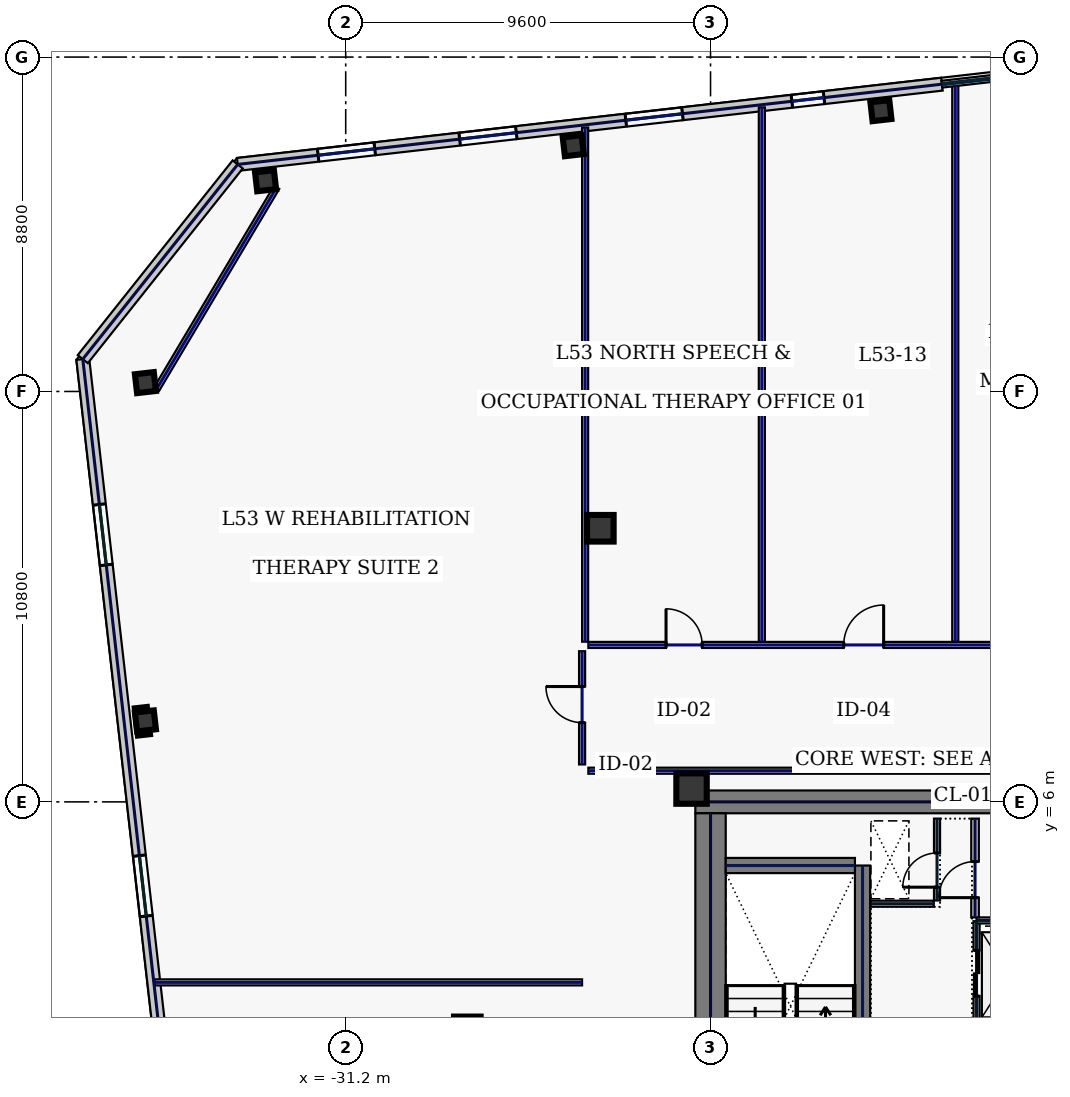
"""IFC4 building model, lengths in metres.
Left out: names, types, materials, properties, quantities, classifications, styles, units other than length and angle.
Written with IfcOpenShell. Run it as: python <this file> out.ifc"""

import sys

from ifc_helpers import new_model, si_unit, direction, frame, frame_2d, origin, origin_2d, place, context, subcontext, project, spatial, rectangle, hollow_rectangle, extrude, element, fill, save


model = new_model("IFC4")
c1 = context("Model", 3, precision=1e-05, world=origin(), true_north=direction((0.0, 1.0)))
c2 = subcontext(c1, "Body", "Model", "MODEL_VIEW")
j1 = project(units=[si_unit("LENGTHUNIT", "METRE"), si_unit("PLANEANGLEUNIT", "RADIAN")], contexts=[c1])
p1 = place(None, origin())
s1 = spatial("IfcSite", under=j1, at=p1, CompositionType="ELEMENT")
p2 = place(p1, origin())
s2 = spatial("IfcBuilding", under=s1, at=p2, CompositionType="ELEMENT")
p3 = place(p2, frame((0.0, 0.0, 230.2)))
s3 = spatial("IfcBuildingStorey", under=s2, at=p3, CompositionType="ELEMENT", Elevation=230.2)
p4 = place(p3, frame((-22.0, 6.0, 0.0), z_axis=(0.0, 0.0, 1.0), x_axis=(1.0, 0.0, 0.0)))
e1 = element("IfcWall", 1, at=p4, inside=s3, PredefinedType="SHEAR", context=c2, shape_type="SweptSolid", body=[
    extrude(rectangle(XDim=11.5, YDim=0.6, at=frame_2d((5.75, 0.0))), origin(), (0.0, 0.0, 1.0), 3.74),
])
p5 = place(p3, frame((-21.6, -5.7, 0.0), z_axis=(0.0, 0.0, 1.0), x_axis=(0.0, 1.0, 0.0)))
e2 = element("IfcWall", 2, at=p5, inside=s3, PredefinedType="SHEAR", context=c2, shape_type="SweptSolid", body=[
    extrude(rectangle(XDim=11.4, YDim=0.8, at=frame_2d((5.7, 0.0))), origin(), (0.0, 0.0, 1.0), 3.74),
])
p6 = place(p3, frame((-17.6, -4.325, 0.0), z_axis=(0.0, 0.0, 1.0), x_axis=(0.0, 1.0, 0.0)))
e3 = element("IfcWall", 3, at=p6, inside=s3, PredefinedType="SHEAR", context=c2, shape_type="SweptSolid", body=[
    extrude(rectangle(XDim=8.65, YDim=0.4, at=frame_2d((4.325, 0.0))), origin(), (0.0, 0.0, 1.0), 3.74),
])
p7 = place(p6, frame((0.25, 0.0, 0.0)))
e4 = element("IfcOpeningElement", 4, at=p7, cuts=e3, PredefinedType="OPENING", context=c2, shape_type="SweptSolid", body=[
    extrude(rectangle(XDim=1.1, YDim=2.2, at=frame_2d((0.55, 1.1))), frame((0.0, 0.21, 0.0), z_axis=(0.0, -1.0, 0.0), x_axis=(1.0, 0.0, 0.0)), (0.0, 0.0, 1.0), 0.42),
])
p8 = place(p3, frame((-21.2, 4.325, 0.0), z_axis=(0.0, 0.0, 1.0), x_axis=(1.0, 0.0, 0.0)))
e5 = element("IfcWall", 5, at=p8, inside=s3, PredefinedType="SHEAR", context=c2, shape_type="SweptSolid", body=[
    extrude(rectangle(XDim=3.4, YDim=0.4, at=frame_2d((1.7, 0.0))), origin(), (0.0, 0.0, 1.0), 3.74),
])
p9 = place(p3, frame((-22.1, 6.35, 0.0), z_axis=(0.0, 0.0, 1.0), x_axis=(1.0, 0.0, 0.0)))
e6 = element("IfcColumn", 6, at=p9, inside=s3, PredefinedType="COLUMN", context=c2, shape_type="SweptSolid", body=[
    extrude(hollow_rectangle(XDim=0.8, YDim=0.8, WallThickness=0.036, at=origin_2d()), origin(), (0.0, 0.0, 1.0), 3.74),
])
for number, where, z_axis, x_axis in (
    (7, (-24.5, 13.2, 0.0), (0.0, 0.0, 1.0), (1.0, 0.0, 0.0)),
    (8, (-28.0, 0.0, 0.0), (0.0, 0.0, 1.0), (1.0, 0.0, 0.0)),
):
    element("IfcColumn", number, at=place(p3, frame(where, z_axis=z_axis, x_axis=x_axis)), inside=s3, PredefinedType="COLUMN", context=c2, shape_type="SweptSolid", body=[
        extrude(hollow_rectangle(XDim=0.7, YDim=0.7, WallThickness=0.032, at=origin_2d()), origin(), (0.0, 0.0, 1.0), 3.74),
    ])
for number, where, z_axis, x_axis in (
    (9, (-17.116, 24.19, 0.0), (0.0, 0.0, 1.0), (0.994, 0.113, 0.0)),
    (10, (-25.212, 23.268, 0.0), (0.0, 0.0, 1.0), (0.994, 0.113, 0.0)),
    (11, (-33.309, 22.345, 0.0), (0.0, 0.0, 1.0), (0.994, 0.113, 0.0)),
    (12, (-36.47, 17.033, 0.0), (0.0, 0.0, 1.0), (0.994, 0.113, 0.0)),
    (13, (-36.47, 8.131, 0.0), (0.0, 0.0, 1.0), (0.994, 0.113, 0.0)),
):
    element("IfcColumn", number, at=place(p3, frame(where, z_axis=z_axis, x_axis=x_axis)), inside=s3, PredefinedType="COLUMN", context=c2, shape_type="SweptSolid", body=[
        extrude(hollow_rectangle(XDim=0.5, YDim=0.5, WallThickness=0.025, at=origin_2d()), origin(), (0.0, 0.0, 1.0), 3.74),
    ])
p10 = place(p3, frame((-15.51, 24.886, 0.0), z_axis=(0.0, 0.0, 1.0), x_axis=(-0.993572271362, -0.113199565282, 0.0)))
e14 = element("IfcWall", 14, at=p10, inside=s3, PredefinedType="STANDARD", context=c2, shape_type="SweptSolid", body=[
    extrude(rectangle(XDim=18.651, YDim=0.34, at=frame_2d((9.326, 0.0))), origin(), (0.0, 0.0, 1.0), 3.74),
])
p11 = place(p10, frame((15.021, 0.0, 0.83)))
e15 = element("IfcOpeningElement", 15, at=p11, cuts=e14, PredefinedType="OPENING", context=c2, shape_type="SweptSolid", body=[
    extrude(rectangle(XDim=1.5, YDim=2.0, at=frame_2d((0.75, 1.0))), frame((0.0, 0.18, 0.0), z_axis=(0.0, -1.0, 0.0), x_axis=(1.0, 0.0, 0.0)), (0.0, 0.0, 1.0), 0.36),
])
p12 = place(p10, frame((11.273, 0.0, 0.83)))
e16 = element("IfcOpeningElement", 16, at=p12, cuts=e14, PredefinedType="OPENING", context=c2, shape_type="SweptSolid", body=[
    extrude(rectangle(XDim=1.5, YDim=2.0, at=frame_2d((0.75, 1.0))), frame((0.0, 0.18, 0.0), z_axis=(0.0, -1.0, 0.0), x_axis=(1.0, 0.0, 0.0)), (0.0, 0.0, 1.0), 0.36),
])
p13 = place(p10, frame((6.873, 0.0, 0.83)))
e17 = element("IfcOpeningElement", 17, at=p13, cuts=e14, PredefinedType="OPENING", context=c2, shape_type="SweptSolid", body=[
    extrude(rectangle(XDim=1.5, YDim=2.0, at=frame_2d((0.75, 1.0))), frame((0.0, 0.18, 0.0), z_axis=(0.0, -1.0, 0.0), x_axis=(1.0, 0.0, 0.0)), (0.0, 0.0, 1.0), 0.36),
])
p14 = place(p10, frame((3.125, 0.0, 0.83)))
e18 = element("IfcOpeningElement", 18, at=p14, cuts=e14, PredefinedType="OPENING", context=c2, shape_type="SweptSolid", body=[
    extrude(rectangle(XDim=0.85, YDim=1.85, at=frame_2d((0.425, 0.925))), frame((0.0, 0.18, 0.0), z_axis=(0.0, -1.0, 0.0), x_axis=(1.0, 0.0, 0.0)), (0.0, 0.0, 1.0), 0.36),
])
p15 = place(p3, frame((-38.118, 17.651, 0.0), z_axis=(0.0, 0.0, 1.0), x_axis=(0.11320360501, -0.9935718111, 0.0)))
e19 = element("IfcWall", 19, at=p15, inside=s3, PredefinedType="STANDARD", context=c2, shape_type="SweptSolid", body=[
    extrude(rectangle(XDim=37.2, YDim=0.34, at=frame_2d((18.6, 0.0))), origin(), (0.0, 0.0, 1.0), 3.74),
])
p16 = place(p15, frame((3.85, 0.0, 0.58)))
e20 = element("IfcOpeningElement", 20, at=p16, cuts=e19, PredefinedType="OPENING", context=c2, shape_type="SweptSolid", body=[
    extrude(rectangle(XDim=1.6, YDim=2.3, at=frame_2d((0.8, 1.15))), frame((0.0, 0.18, 0.0), z_axis=(0.0, -1.0, 0.0), x_axis=(1.0, 0.0, 0.0)), (0.0, 0.0, 1.0), 0.36),
])
p17 = place(p15, frame((13.15, 0.0, 0.58)))
e21 = element("IfcOpeningElement", 21, at=p17, cuts=e19, PredefinedType="OPENING", context=c2, shape_type="SweptSolid", body=[
    extrude(rectangle(XDim=1.6, YDim=2.3, at=frame_2d((0.8, 1.15))), frame((0.0, 0.18, 0.0), z_axis=(0.0, -1.0, 0.0), x_axis=(1.0, 0.0, 0.0)), (0.0, 0.0, 1.0), 0.36),
])
p18 = place(p15, frame((22.45, 0.0, 0.58)))
e22 = element("IfcOpeningElement", 22, at=p18, cuts=e19, PredefinedType="OPENING", context=c2, shape_type="SweptSolid", body=[
    extrude(rectangle(XDim=1.6, YDim=2.3, at=frame_2d((0.8, 1.15))), frame((0.0, 0.18, 0.0), z_axis=(0.0, -1.0, 0.0), x_axis=(1.0, 0.0, 0.0)), (0.0, 0.0, 1.0), 0.36),
])
p19 = place(p15, frame((31.75, 0.0, 0.58)))
e23 = element("IfcOpeningElement", 23, at=p19, cuts=e19, PredefinedType="OPENING", context=c2, shape_type="SweptSolid", body=[
    extrude(rectangle(XDim=1.6, YDim=2.3, at=frame_2d((0.8, 1.15))), frame((0.0, 0.18, 0.0), z_axis=(0.0, -1.0, 0.0), x_axis=(1.0, 0.0, 0.0)), (0.0, 0.0, 1.0), 0.36),
])
p20 = place(p3, frame((-34.042, 22.775, 0.0), z_axis=(0.0, 0.0, 1.0), x_axis=(-0.62252823689, -0.78259733853, 0.0)))
e24 = element("IfcWall", 24, at=p20, inside=s3, PredefinedType="STANDARD", context=c2, shape_type="SweptSolid", body=[
    extrude(rectangle(XDim=6.548, YDim=0.34, at=frame_2d((3.274, 0.0))), origin(), (0.0, 0.0, 1.0), 3.74),
])
p21 = place(p3, frame((-14.6, 0.12, 0.0), z_axis=(0.0, 0.0, 1.0), x_axis=(0.0, 1.0, 0.0)))
e25 = element("IfcWall", 25, at=p21, inside=s3, PredefinedType="PARTITIONING", context=c2, shape_type="SweptSolid", body=[
    extrude(rectangle(XDim=2.74, YDim=0.16, at=frame_2d((1.37, 0.0))), origin(), (0.0, 0.0, 1.0), 3.74),
])
p22 = place(p21, frame((0.77, 0.0, 0.0)))
e26 = element("IfcOpeningElement", 26, at=p22, cuts=e25, PredefinedType="OPENING", context=c2, shape_type="SweptSolid", body=[
    extrude(rectangle(XDim=1.2, YDim=2.2, at=frame_2d((0.6, 1.1))), frame((0.0, 0.09, 0.0), z_axis=(0.0, -1.0, 0.0), x_axis=(1.0, 0.0, 0.0)), (0.0, 0.0, 1.0), 0.18),
])
p23 = place(p3, frame((-14.6, 2.88, 0.0), z_axis=(0.0, 0.0, 1.0), x_axis=(1.0, 0.0, 0.0)))
e27 = element("IfcWall", 27, at=p23, inside=s3, PredefinedType="PARTITIONING", context=c2, shape_type="SweptSolid", body=[
    extrude(rectangle(XDim=1.76, YDim=0.16, at=frame_2d((0.88, 0.0))), origin(), (0.0, 0.0, 1.0), 3.74),
])
p24 = place(p3, frame((-15.64, 3.405, 0.0), z_axis=(0.0, 0.0, 1.0), x_axis=(0.0, 1.0, 0.0)))
e28 = element("IfcWall", 28, at=p24, inside=s3, PredefinedType="PARTITIONING", context=c2, shape_type="SweptSolid", body=[
    extrude(rectangle(XDim=2.155, YDim=0.16, at=frame_2d((1.078, 0.0))), origin(), (0.0, 0.0, 1.0), 3.74),
])
p25 = place(p24, frame((0.35, 0.0, 0.0)))
e29 = element("IfcOpeningElement", 29, at=p25, cuts=e28, PredefinedType="OPENING", context=c2, shape_type="SweptSolid", body=[
    extrude(rectangle(XDim=0.9, YDim=2.2, at=frame_2d((0.45, 1.1))), frame((0.0, 0.09, 0.0), z_axis=(0.0, -1.0, 0.0), x_axis=(1.0, 0.0, 0.0)), (0.0, 0.0, 1.0), 0.18),
])
p26 = place(p3, frame((-17.38, 3.32, 0.0), z_axis=(0.0, 0.0, 1.0), x_axis=(1.0, 0.0, 0.0)))
e30 = element("IfcWall", 30, at=p26, inside=s3, PredefinedType="PARTITIONING", context=c2, shape_type="SweptSolid", body=[
    extrude(rectangle(XDim=1.655, YDim=0.16, at=frame_2d((0.827, 0.0))), origin(), (0.0, 0.0, 1.0), 3.74),
])
p27 = place(p3, frame((-14.64, 2.96, 0.0), z_axis=(0.0, 0.0, 1.0), x_axis=(0.0, 1.0, 0.0)))
e31 = element("IfcWall", 31, at=p27, inside=s3, PredefinedType="SOLIDWALL", context=c2, shape_type="SweptSolid", body=[
    extrude(rectangle(XDim=2.6, YDim=0.2, at=frame_2d((1.3, 0.0))), origin(), (0.0, 0.0, 1.0), 3.74),
])
p28 = place(p27, frame((0.52, 0.0, 0.0)))
e32 = element("IfcOpeningElement", 32, at=p28, cuts=e31, PredefinedType="OPENING", context=c2, shape_type="SweptSolid", body=[
    extrude(rectangle(XDim=0.95, YDim=2.2, at=frame_2d((0.475, 1.1))), frame((0.0, 0.11, 0.0), z_axis=(0.0, -1.0, 0.0), x_axis=(1.0, 0.0, 0.0)), (0.0, 0.0, 1.0), 0.22),
])
p29 = place(p3, frame((-33.016, 22.171, 0.0), z_axis=(0.0, 0.0, 1.0), x_axis=(-0.511385266265, -0.859351563359, 0.0)))
e33 = element("IfcWall", 33, at=p29, inside=s3, PredefinedType="PARTITIONING", context=c2, shape_type="SweptSolid", body=[
    extrude(rectangle(XDim=6.182, YDim=0.16, at=frame_2d((3.091, 0.0))), origin(), (0.0, 0.0, 1.0), 3.74),
])
p30 = place(p3, frame((-10.63, 6.82, 0.0), z_axis=(0.0, 0.0, 1.0), x_axis=(-1.0, 0.0, 0.0)))
e34 = element("IfcWall", 34, at=p30, inside=s3, PredefinedType="PARTITIONING", context=c2, shape_type="SweptSolid", body=[
    extrude(rectangle(XDim=14.185, YDim=0.16, at=frame_2d((7.093, 0.0))), origin(), (0.0, 0.0, 1.0), 3.74),
])
p31 = place(p3, frame((-24.98, 6.985, 0.0), z_axis=(0.0, 0.0, 1.0), x_axis=(0.0, 1.0, 0.0)))
e35 = element("IfcWall", 35, at=p31, inside=s3, PredefinedType="PARTITIONING", context=c2, shape_type="SweptSolid", body=[
    extrude(rectangle(XDim=2.98, YDim=0.16, at=frame_2d((1.49, 0.0))), origin(), (0.0, 0.0, 1.0), 3.74),
])
p32 = place(p31, frame((1.1, 0.0, 0.0)))
e36 = element("IfcOpeningElement", 36, at=p32, cuts=e35, PredefinedType="OPENING", context=c2, shape_type="SweptSolid", body=[
    extrude(rectangle(XDim=0.95, YDim=2.2, at=frame_2d((0.475, 1.1))), frame((0.0, 0.09, 0.0), z_axis=(0.0, -1.0, 0.0), x_axis=(1.0, 0.0, 0.0)), (0.0, 0.0, 1.0), 0.18),
])
p33 = place(p3, frame((-24.815, 10.13, 0.0), z_axis=(0.0, 0.0, 1.0), x_axis=(1.0, 0.0, 0.0)))
e37 = element("IfcWall", 37, at=p33, inside=s3, PredefinedType="PARTITIONING", context=c2, shape_type="SweptSolid", body=[
    extrude(rectangle(XDim=49.63, YDim=0.16, at=frame_2d((24.815, 0.0))), origin(), (0.0, 0.0, 1.0), 3.74),
])
p34 = place(p33, frame((2.044, 0.0, 0.0)))
e38 = element("IfcOpeningElement", 38, at=p34, cuts=e37, PredefinedType="OPENING", context=c2, shape_type="SweptSolid", body=[
    extrude(rectangle(XDim=0.95, YDim=2.2, at=frame_2d((0.475, 1.1))), frame((0.0, 0.09, 0.0), z_axis=(0.0, -1.0, 0.0), x_axis=(1.0, 0.0, 0.0)), (0.0, 0.0, 1.0), 0.18),
])
p35 = place(p33, frame((6.72, 0.0, 0.0)))
e39 = element("IfcOpeningElement", 39, at=p35, cuts=e37, PredefinedType="OPENING", context=c2, shape_type="SweptSolid", body=[
    extrude(rectangle(XDim=1.05, YDim=2.2, at=frame_2d((0.525, 1.1))), frame((0.0, 0.09, 0.0), z_axis=(0.0, -1.0, 0.0), x_axis=(1.0, 0.0, 0.0)), (0.0, 0.0, 1.0), 0.18),
])
p36 = place(p33, frame((12.945, 0.0, 0.0)))
e40 = element("IfcOpeningElement", 40, at=p36, cuts=e37, PredefinedType="OPENING", context=c2, shape_type="SweptSolid", body=[
    extrude(rectangle(XDim=0.95, YDim=2.2, at=frame_2d((0.475, 1.1))), frame((0.0, 0.09, 0.0), z_axis=(0.0, -1.0, 0.0), x_axis=(1.0, 0.0, 0.0)), (0.0, 0.0, 1.0), 0.18),
])
p37 = place(p33, frame((20.825, 0.0, 0.0)))
e41 = element("IfcOpeningElement", 41, at=p37, cuts=e37, PredefinedType="OPENING", context=c2, shape_type="SweptSolid", body=[
    extrude(rectangle(XDim=0.95, YDim=2.2, at=frame_2d((0.475, 1.1))), frame((0.0, 0.09, 0.0), z_axis=(0.0, -1.0, 0.0), x_axis=(1.0, 0.0, 0.0)), (0.0, 0.0, 1.0), 0.18),
])
p38 = place(p33, frame((29.325, 0.0, 0.0)))
e42 = element("IfcOpeningElement", 42, at=p38, cuts=e37, PredefinedType="OPENING", context=c2, shape_type="SweptSolid", body=[
    extrude(rectangle(XDim=0.95, YDim=2.2, at=frame_2d((0.475, 1.1))), frame((0.0, 0.09, 0.0), z_axis=(0.0, -1.0, 0.0), x_axis=(1.0, 0.0, 0.0)), (0.0, 0.0, 1.0), 0.18),
])
p39 = place(p33, frame((37.725, 0.0, 0.0)))
e43 = element("IfcOpeningElement", 43, at=p39, cuts=e37, PredefinedType="OPENING", context=c2, shape_type="SweptSolid", body=[
    extrude(rectangle(XDim=0.95, YDim=2.2, at=frame_2d((0.475, 1.1))), frame((0.0, 0.09, 0.0), z_axis=(0.0, -1.0, 0.0), x_axis=(1.0, 0.0, 0.0)), (0.0, 0.0, 1.0), 0.18),
])
p40 = place(p33, frame((45.381, 0.0, 0.0)))
e44 = element("IfcOpeningElement", 44, at=p40, cuts=e37, PredefinedType="OPENING", context=c2, shape_type="SweptSolid", body=[
    extrude(rectangle(XDim=1.05, YDim=2.2, at=frame_2d((0.525, 1.1))), frame((0.0, 0.09, 0.0), z_axis=(0.0, -1.0, 0.0), x_axis=(1.0, 0.0, 0.0)), (0.0, 0.0, 1.0), 0.18),
])
p41 = place(p3, frame((-24.9, 10.215, 0.0), z_axis=(0.0, 0.0, 1.0), x_axis=(0.0, 1.0, 0.0)))
e45 = element("IfcWall", 45, at=p41, inside=s3, PredefinedType="PARTITIONING", context=c2, shape_type="SweptSolid", body=[
    extrude(rectangle(XDim=13.531, YDim=0.16, at=frame_2d((6.766, 0.0))), origin(), (0.0, 0.0, 1.0), 3.285),
])
p42 = place(p3, frame((-20.25, 10.215, 0.0), z_axis=(0.0, 0.0, 1.0), x_axis=(0.0, 1.0, 0.0)))
e46 = element("IfcWall", 46, at=p42, inside=s3, PredefinedType="PARTITIONING", context=c2, shape_type="SweptSolid", body=[
    extrude(rectangle(XDim=14.061, YDim=0.16, at=frame_2d((7.031, 0.0))), origin(), (0.0, 0.0, 1.0), 3.74),
])
p43 = place(p3, frame((-15.16, 10.215, 0.0), z_axis=(0.0, 0.0, 1.0), x_axis=(0.0, 1.0, 0.0)))
e47 = element("IfcWall", 47, at=p43, inside=s3, PredefinedType="PARTITIONING", context=c2, shape_type="SweptSolid", body=[
    extrude(rectangle(XDim=14.641, YDim=0.16, at=frame_2d((7.32, 0.0))), origin(), (0.0, 0.0, 1.0), 3.74),
])
p44 = place(p3, frame((-36.229, 1.25, 0.0), z_axis=(0.0, 0.0, 1.0), x_axis=(1.0, 0.0, 0.0)))
e48 = element("IfcWall", 48, at=p44, inside=s3, PredefinedType="PARTITIONING", context=c2, shape_type="SweptSolid", body=[
    extrude(rectangle(XDim=11.25, YDim=0.16, at=frame_2d((5.625, 0.0))), origin(), (0.0, 0.0, 1.0), 3.74),
])
p45 = place(p11, origin())
e49 = element("IfcWindow", 49, at=p45, inside=s3, PartitioningType="SINGLE_PANEL", PredefinedType="WINDOW", context=c2, shape_type="SweptSolid", body=[
    extrude(rectangle(XDim=1.5, YDim=2.0, at=frame_2d((0.75, 1.0))), frame((0.0, 0.03, 0.0), z_axis=(0.0, -1.0, 0.0), x_axis=(1.0, 0.0, 0.0)), (0.0, 0.0, 1.0), 0.06),
])
fill(e15, e49)
p46 = place(p12, origin())
e50 = element("IfcWindow", 50, at=p46, inside=s3, PartitioningType="SINGLE_PANEL", PredefinedType="WINDOW", context=c2, shape_type="SweptSolid", body=[
    extrude(rectangle(XDim=1.5, YDim=2.0, at=frame_2d((0.75, 1.0))), frame((0.0, 0.03, 0.0), z_axis=(0.0, -1.0, 0.0), x_axis=(1.0, 0.0, 0.0)), (0.0, 0.0, 1.0), 0.06),
])
fill(e16, e50)
p47 = place(p13, origin())
e51 = element("IfcWindow", 51, at=p47, inside=s3, PartitioningType="SINGLE_PANEL", PredefinedType="WINDOW", context=c2, shape_type="SweptSolid", body=[
    extrude(rectangle(XDim=1.5, YDim=2.0, at=frame_2d((0.75, 1.0))), frame((0.0, 0.03, 0.0), z_axis=(0.0, -1.0, 0.0), x_axis=(1.0, 0.0, 0.0)), (0.0, 0.0, 1.0), 0.06),
])
fill(e17, e51)
p48 = place(p14, origin())
e52 = element("IfcWindow", 52, at=p48, inside=s3, PartitioningType="SINGLE_PANEL", PredefinedType="WINDOW", context=c2, shape_type="SweptSolid", body=[
    extrude(rectangle(XDim=0.85, YDim=1.85, at=frame_2d((0.425, 0.925))), frame((0.0, 0.03, 0.0), z_axis=(0.0, -1.0, 0.0), x_axis=(1.0, 0.0, 0.0)), (0.0, 0.0, 1.0), 0.06),
])
fill(e18, e52)
p49 = place(p16, origin())
e53 = element("IfcWindow", 53, at=p49, inside=s3, PartitioningType="SINGLE_PANEL", PredefinedType="WINDOW", context=c2, shape_type="SweptSolid", body=[
    extrude(rectangle(XDim=1.6, YDim=2.3, at=frame_2d((0.8, 1.15))), frame((0.0, 0.03, 0.0), z_axis=(0.0, -1.0, 0.0), x_axis=(1.0, 0.0, 0.0)), (0.0, 0.0, 1.0), 0.06),
])
fill(e20, e53)
p50 = place(p17, origin())
e54 = element("IfcWindow", 54, at=p50, inside=s3, PartitioningType="SINGLE_PANEL", PredefinedType="WINDOW", context=c2, shape_type="SweptSolid", body=[
    extrude(rectangle(XDim=1.6, YDim=2.3, at=frame_2d((0.8, 1.15))), frame((0.0, 0.03, 0.0), z_axis=(0.0, -1.0, 0.0), x_axis=(1.0, 0.0, 0.0)), (0.0, 0.0, 1.0), 0.06),
])
fill(e21, e54)
p51 = place(p22, origin())
e55 = element("IfcDoor", 55, at=p51, inside=s3, OperationType="SLIDING_TO_LEFT", PredefinedType="DOOR", context=c2, shape_type="SweptSolid", body=[
    extrude(rectangle(XDim=1.2, YDim=2.2, at=frame_2d((0.6, 1.1))), frame((0.0, 0.025, 0.0), z_axis=(0.0, -1.0, 0.0), x_axis=(1.0, 0.0, 0.0)), (0.0, 0.0, 1.0), 0.05),
])
fill(e26, e55)
p52 = place(p25, origin())
e56 = element("IfcDoor", 56, at=p52, inside=s3, OperationType="SINGLE_SWING_LEFT", PredefinedType="DOOR", context=c2, shape_type="SweptSolid", body=[
    extrude(rectangle(XDim=0.9, YDim=2.2, at=frame_2d((0.45, 1.1))), frame((0.0, 0.025, 0.0), z_axis=(0.0, -1.0, 0.0), x_axis=(1.0, 0.0, 0.0)), (0.0, 0.0, 1.0), 0.05),
])
fill(e29, e56)
p53 = place(p28, origin())
e57 = element("IfcDoor", 57, at=p53, inside=s3, OperationType="SINGLE_SWING_LEFT", PredefinedType="DOOR", context=c2, shape_type="SweptSolid", body=[
    extrude(rectangle(XDim=0.95, YDim=2.2, at=frame_2d((0.475, 1.1))), frame((0.0, 0.025, 0.0), z_axis=(0.0, -1.0, 0.0), x_axis=(1.0, 0.0, 0.0)), (0.0, 0.0, 1.0), 0.05),
])
fill(e32, e57)
p54 = place(p34, origin())
e58 = element("IfcDoor", 58, at=p54, inside=s3, OperationType="SINGLE_SWING_LEFT", PredefinedType="DOOR", context=c2, shape_type="SweptSolid", body=[
    extrude(rectangle(XDim=0.95, YDim=2.2, at=frame_2d((0.475, 1.1))), frame((0.0, 0.025, 0.0), z_axis=(0.0, -1.0, 0.0), x_axis=(1.0, 0.0, 0.0)), (0.0, 0.0, 1.0), 0.05),
])
fill(e38, e58)
p55 = place(p35, origin())
e59 = element("IfcDoor", 59, at=p55, inside=s3, OperationType="SINGLE_SWING_RIGHT", PredefinedType="DOOR", context=c2, shape_type="SweptSolid", body=[
    extrude(rectangle(XDim=1.05, YDim=2.2, at=frame_2d((0.525, 1.1))), frame((0.0, 0.025, 0.0), z_axis=(0.0, -1.0, 0.0), x_axis=(1.0, 0.0, 0.0)), (0.0, 0.0, 1.0), 0.05),
])
fill(e39, e59)
p56 = place(p32, origin())
e60 = element("IfcDoor", 60, at=p56, inside=s3, OperationType="SINGLE_SWING_RIGHT", PredefinedType="DOOR", context=c2, shape_type="SweptSolid", body=[
    extrude(rectangle(XDim=0.95, YDim=2.2, at=frame_2d((0.475, 1.1))), frame((0.0, 0.025, 0.0), z_axis=(0.0, -1.0, 0.0), x_axis=(1.0, 0.0, 0.0)), (0.0, 0.0, 1.0), 0.05),
])
fill(e36, e60)
save(model, sys.argv[1])
